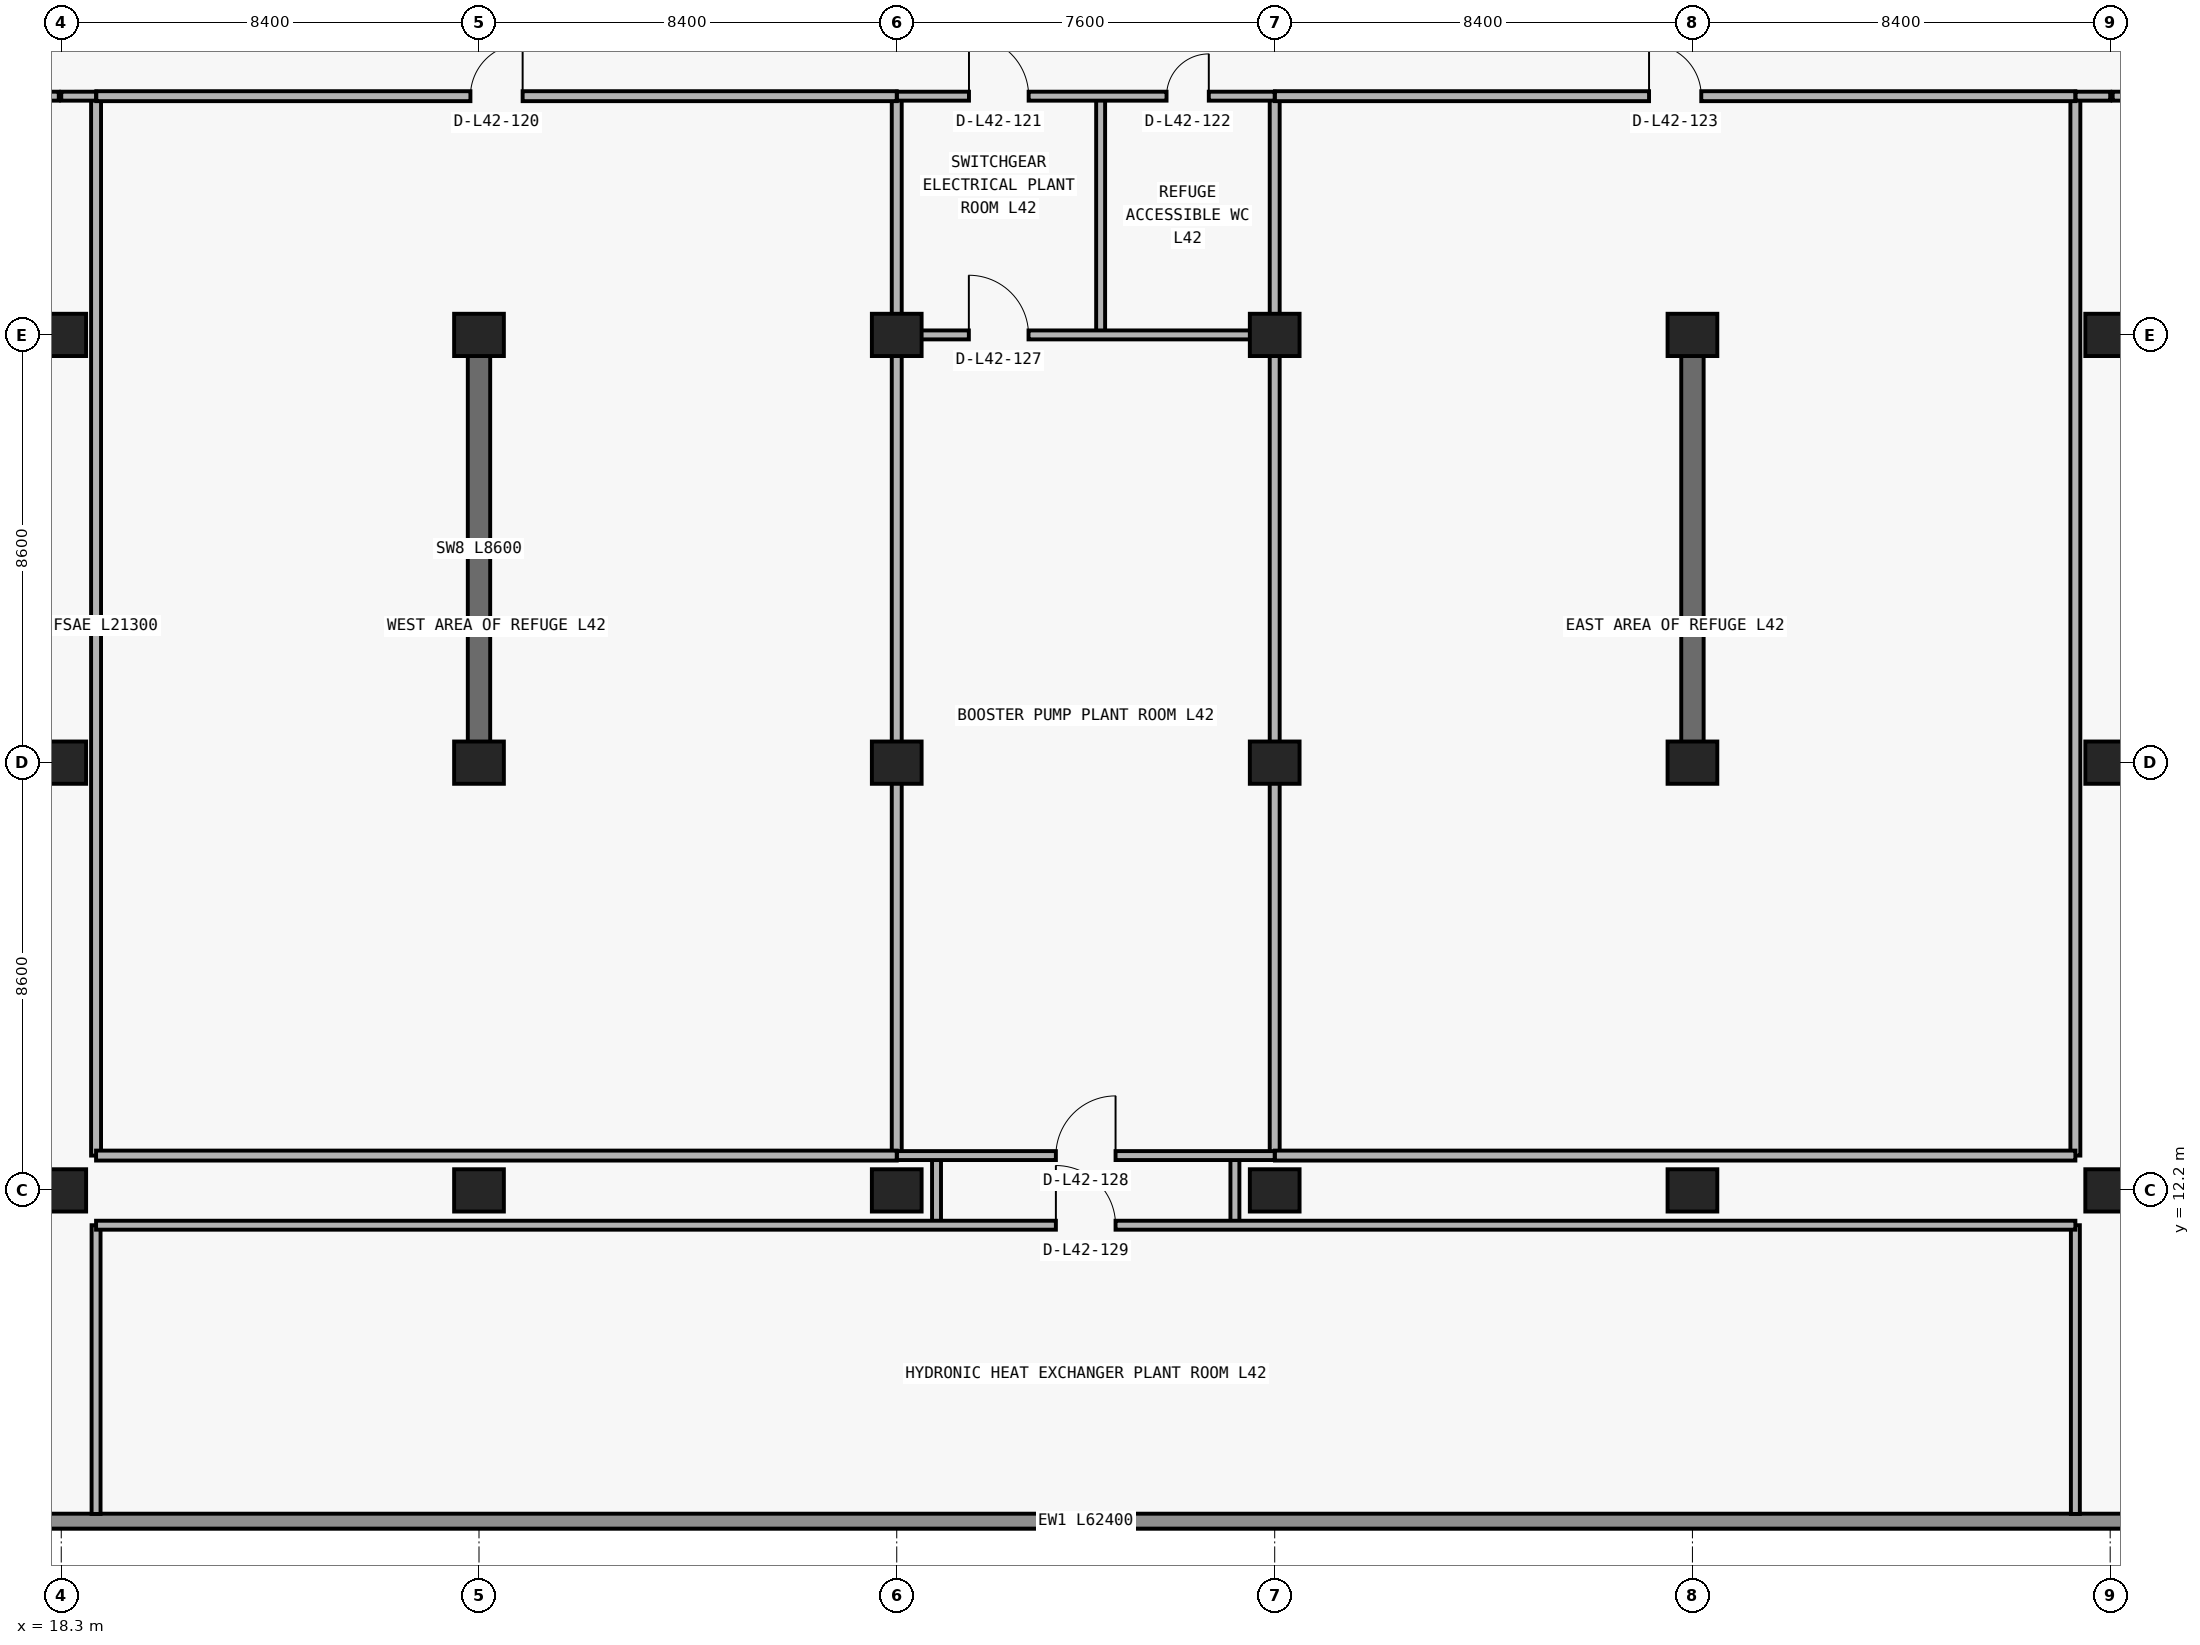
"""IFC4 building model, lengths in metres.
Left out: names, types, materials, properties, quantities, classifications, styles, units other than length and angle.
Written with IfcOpenShell. Run it as: python <this file> out.ifc"""

import sys

from ifc_helpers import new_model, si_unit, direction, frame, frame_2d, origin, origin_2d, place, context, subcontext, project, spatial, rectangle, extrude, element, fill, save


model = new_model("IFC4")
c1 = context("Model", 3, precision=1e-05, world=origin(), true_north=direction((0.0, 1.0)))
c2 = subcontext(c1, "Body", "Model", "MODEL_VIEW")
j1 = project(units=[si_unit("LENGTHUNIT", "METRE"), si_unit("PLANEANGLEUNIT", "RADIAN")], contexts=[c1])
p1 = place(None, origin())
s1 = spatial("IfcSite", under=j1, at=p1, CompositionType="ELEMENT")
p2 = place(p1, origin())
s2 = spatial("IfcBuilding", under=s1, at=p2, CompositionType="ELEMENT")
p3 = place(p2, frame((0.0, 0.0, 152.1)))
s3 = spatial("IfcBuildingStorey", under=s2, at=p3, CompositionType="ELEMENT", Elevation=152.1)
for number, where, z_axis, x_axis in (
    (1, (18.3, 12.2, 0.0), (0.0, 0.0, 1.0), (1.0, 0.0, 0.0)),
    (2, (26.7, 12.2, 0.0), (0.0, 0.0, 1.0), (1.0, 0.0, 0.0)),
    (3, (35.1, 12.2, 0.0), (0.0, 0.0, 1.0), (1.0, 0.0, 0.0)),
    (4, (42.7, 12.2, 0.0), (0.0, 0.0, 1.0), (1.0, 0.0, 0.0)),
    (5, (51.1, 12.2, 0.0), (0.0, 0.0, 1.0), (1.0, 0.0, 0.0)),
    (6, (59.5, 12.2, 0.0), (0.0, 0.0, 1.0), (1.0, 0.0, 0.0)),
    (7, (18.3, 20.8, 0.0), (0.0, 0.0, 1.0), (1.0, 0.0, 0.0)),
    (8, (26.7, 20.8, 0.0), (0.0, 0.0, 1.0), (1.0, 0.0, 0.0)),
    (9, (35.1, 20.8, 0.0), (0.0, 0.0, 1.0), (1.0, 0.0, 0.0)),
    (10, (42.7, 20.8, 0.0), (0.0, 0.0, 1.0), (1.0, 0.0, 0.0)),
    (11, (51.1, 20.8, 0.0), (0.0, 0.0, 1.0), (1.0, 0.0, 0.0)),
    (12, (59.5, 20.8, 0.0), (0.0, 0.0, 1.0), (1.0, 0.0, 0.0)),
    (13, (18.3, 29.4, 0.0), (0.0, 0.0, 1.0), (1.0, 0.0, 0.0)),
    (14, (26.7, 29.4, 0.0), (0.0, 0.0, 1.0), (1.0, 0.0, 0.0)),
    (15, (35.1, 29.4, 0.0), (0.0, 0.0, 1.0), (1.0, 0.0, 0.0)),
    (16, (42.7, 29.4, 0.0), (0.0, 0.0, 1.0), (1.0, 0.0, 0.0)),
    (17, (51.1, 29.4, 0.0), (0.0, 0.0, 1.0), (1.0, 0.0, 0.0)),
    (18, (59.5, 29.4, 0.0), (0.0, 0.0, 1.0), (1.0, 0.0, 0.0)),
):
    element("IfcColumn", number, at=place(p3, frame(where, z_axis=z_axis, x_axis=x_axis)), inside=s3, PredefinedType="COLUMN", context=c2, shape_type="SweptSolid", body=[
        extrude(rectangle(XDim=1.0, YDim=0.85, at=origin_2d()), origin(), (0.0, 0.0, 1.0), 4.85),
    ])
for number, where, z_axis, x_axis in (
    (19, (26.7, 20.8, 0.0), (0.0, 0.0, 1.0), (0.0, 1.0, 0.0)),
    (20, (51.1, 20.8, 0.0), (0.0, 0.0, 1.0), (0.0, 1.0, 0.0)),
):
    element("IfcWall", number, at=place(p3, frame(where, z_axis=z_axis, x_axis=x_axis)), inside=s3, PredefinedType="SHEAR", context=c2, shape_type="SweptSolid", body=[
        extrude(rectangle(XDim=8.6, YDim=0.45, at=frame_2d((4.3, 0.0))), origin(), (0.0, 0.0, 1.0), 4.85),
    ])
p4 = place(p3, frame((70.1, 5.55, 0.0), z_axis=(0.0, 0.0, 1.0), x_axis=(-1.0, 0.0, 0.0)))
e21 = element("IfcWall", 21, at=p4, inside=s3, PredefinedType="STANDARD", context=c2, shape_type="SweptSolid", body=[
    extrude(rectangle(XDim=62.4, YDim=0.3, at=frame_2d((31.2, 0.0))), origin(), (0.0, 0.0, 1.0), 4.85),
])
p5 = place(p3, frame((19.0, 5.695, 0.0), z_axis=(0.0, 0.0, 1.0), x_axis=(0.0, 1.0, 0.0)))
e22 = element("IfcWall", 22, at=p5, inside=s3, PredefinedType="PARTITIONING", context=c2, shape_type="SweptSolid", body=[
    extrude(rectangle(XDim=5.805, YDim=0.18, at=frame_2d((2.902, 0.0))), origin(), (0.0, 0.0, 1.0), 4.85),
])
p6 = place(p3, frame((19.0, 12.9, 0.0), z_axis=(0.0, 0.0, 1.0), x_axis=(0.0, 1.0, 0.0)))
e23 = element("IfcWall", 23, at=p6, inside=s3, PredefinedType="PARTITIONING", context=c2, shape_type="SweptSolid", body=[
    extrude(rectangle(XDim=21.3, YDim=0.2, at=frame_2d((10.65, 0.0))), origin(), (0.0, 0.0, 1.0), 4.85),
])
p7 = place(p3, frame((35.1, 12.9, 0.0), z_axis=(0.0, 0.0, 1.0), x_axis=(0.0, 1.0, 0.0)))
e24 = element("IfcWall", 24, at=p7, inside=s3, PredefinedType="PARTITIONING", context=c2, shape_type="SweptSolid", body=[
    extrude(rectangle(XDim=21.3, YDim=0.2, at=frame_2d((10.65, 0.0))), origin(), (0.0, 0.0, 1.0), 3.814),
])
p8 = place(p3, frame((35.9, 11.5, 0.0), z_axis=(0.0, 0.0, 1.0), x_axis=(0.0, 1.0, 0.0)))
e25 = element("IfcWall", 25, at=p8, inside=s3, PredefinedType="PARTITIONING", context=c2, shape_type="SweptSolid", body=[
    extrude(rectangle(XDim=1.4, YDim=0.18, at=frame_2d((0.7, 0.0))), origin(), (0.0, 0.0, 1.0), 4.85),
])
p9 = place(p3, frame((39.2, 29.4, 0.0), z_axis=(0.0, 0.0, 1.0), x_axis=(0.0, 1.0, 0.0)))
e26 = element("IfcWall", 26, at=p9, inside=s3, PredefinedType="PARTITIONING", context=c2, shape_type="SweptSolid", body=[
    extrude(rectangle(XDim=4.8, YDim=0.18, at=frame_2d((2.4, 0.0))), origin(), (0.0, 0.0, 1.0), 4.85),
])
p10 = place(p3, frame((41.9, 11.5, 0.0), z_axis=(0.0, 0.0, 1.0), x_axis=(0.0, 1.0, 0.0)))
e27 = element("IfcWall", 27, at=p10, inside=s3, PredefinedType="PARTITIONING", context=c2, shape_type="SweptSolid", body=[
    extrude(rectangle(XDim=1.4, YDim=0.18, at=frame_2d((0.7, 0.0))), origin(), (0.0, 0.0, 1.0), 4.85),
])
p11 = place(p3, frame((42.7, 12.9, 0.0), z_axis=(0.0, 0.0, 1.0), x_axis=(0.0, 1.0, 0.0)))
e28 = element("IfcWall", 28, at=p11, inside=s3, PredefinedType="PARTITIONING", context=c2, shape_type="SweptSolid", body=[
    extrude(rectangle(XDim=21.3, YDim=0.2, at=frame_2d((10.65, 0.0))), origin(), (0.0, 0.0, 1.0), 3.814),
])
p12 = place(p3, frame((58.8, 5.695, 0.0), z_axis=(0.0, 0.0, 1.0), x_axis=(0.0, 1.0, 0.0)))
e29 = element("IfcWall", 29, at=p12, inside=s3, PredefinedType="PARTITIONING", context=c2, shape_type="SweptSolid", body=[
    extrude(rectangle(XDim=5.805, YDim=0.18, at=frame_2d((2.902, 0.0))), origin(), (0.0, 0.0, 1.0), 4.85),
])
p13 = place(p3, frame((58.8, 12.9, 0.0), z_axis=(0.0, 0.0, 1.0), x_axis=(0.0, 1.0, 0.0)))
e30 = element("IfcWall", 30, at=p13, inside=s3, PredefinedType="PARTITIONING", context=c2, shape_type="SweptSolid", body=[
    extrude(rectangle(XDim=21.3, YDim=0.2, at=frame_2d((10.65, 0.0))), origin(), (0.0, 0.0, 1.0), 4.85),
])
p14 = place(p3, frame((19.0, 11.5, 0.0), z_axis=(0.0, 0.0, 1.0), x_axis=(1.0, 0.0, 0.0)))
e31 = element("IfcWall", 31, at=p14, inside=s3, PredefinedType="PARTITIONING", context=c2, shape_type="SweptSolid", body=[
    extrude(rectangle(XDim=39.8, YDim=0.18, at=frame_2d((19.9, 0.0))), origin(), (0.0, 0.0, 1.0), 4.85),
])
p15 = place(p14, frame((19.3, 0.0, 0.0)))
e32 = element("IfcOpeningElement", 32, at=p15, cuts=e31, PredefinedType="OPENING", context=c2, shape_type="SweptSolid", body=[
    extrude(rectangle(XDim=1.2, YDim=2.2, at=frame_2d((0.6, 1.1))), frame((0.0, 0.1, 0.0), z_axis=(0.0, -1.0, 0.0), x_axis=(1.0, 0.0, 0.0)), (0.0, 0.0, 1.0), 0.2),
])
p16 = place(p3, frame((19.0, 12.9, 0.0), z_axis=(0.0, 0.0, 1.0), x_axis=(1.0, 0.0, 0.0)))
e33 = element("IfcWall", 33, at=p16, inside=s3, PredefinedType="PARTITIONING", context=c2, shape_type="SweptSolid", body=[
    extrude(rectangle(XDim=16.1, YDim=0.2, at=frame_2d((8.05, 0.0))), origin(), (0.0, 0.0, 1.0), 4.85),
])
p17 = place(p3, frame((35.105, 12.9, 0.0), z_axis=(0.0, 0.0, 1.0), x_axis=(1.0, 0.0, 0.0)))
e34 = element("IfcWall", 34, at=p17, inside=s3, PredefinedType="PARTITIONING", context=c2, shape_type="SweptSolid", body=[
    extrude(rectangle(XDim=7.595, YDim=0.18, at=frame_2d((3.797, 0.0))), origin(), (0.0, 0.0, 1.0), 4.85),
])
p18 = place(p17, frame((3.195, 0.0, 0.0)))
e35 = element("IfcOpeningElement", 35, at=p18, cuts=e34, PredefinedType="OPENING", context=c2, shape_type="SweptSolid", body=[
    extrude(rectangle(XDim=1.2, YDim=2.2, at=frame_2d((0.6, 1.1))), frame((0.0, 0.1, 0.0), z_axis=(0.0, -1.0, 0.0), x_axis=(1.0, 0.0, 0.0)), (0.0, 0.0, 1.0), 0.2),
])
p19 = place(p3, frame((42.705, 12.9, 0.0), z_axis=(0.0, 0.0, 1.0), x_axis=(1.0, 0.0, 0.0)))
e36 = element("IfcWall", 36, at=p19, inside=s3, PredefinedType="PARTITIONING", context=c2, shape_type="SweptSolid", body=[
    extrude(rectangle(XDim=16.095, YDim=0.2, at=frame_2d((8.047, 0.0))), origin(), (0.0, 0.0, 1.0), 4.85),
])
p20 = place(p3, frame((35.1, 29.4, 0.0), z_axis=(0.0, 0.0, 1.0), x_axis=(1.0, 0.0, 0.0)))
e37 = element("IfcWall", 37, at=p20, inside=s3, PredefinedType="PARTITIONING", context=c2, shape_type="SweptSolid", body=[
    extrude(rectangle(XDim=7.6, YDim=0.18, at=frame_2d((3.8, 0.0))), origin(), (0.0, 0.0, 1.0), 3.814),
])
p21 = place(p20, frame((1.45, 0.0, 0.0)))
e38 = element("IfcOpeningElement", 38, at=p21, cuts=e37, PredefinedType="OPENING", context=c2, shape_type="SweptSolid", body=[
    extrude(rectangle(XDim=1.2, YDim=2.2, at=frame_2d((0.6, 1.1))), frame((0.0, 0.1, 0.0), z_axis=(0.0, -1.0, 0.0), x_axis=(1.0, 0.0, 0.0)), (0.0, 0.0, 1.0), 0.2),
])
p22 = place(p3, frame((7.7, 34.2, 0.0), z_axis=(0.0, 0.0, 1.0), x_axis=(1.0, 0.0, 0.0)))
e39 = element("IfcWall", 39, at=p22, inside=s3, PredefinedType="PARTITIONING", context=c2, shape_type="SweptSolid", body=[
    extrude(rectangle(XDim=10.55, YDim=0.18, at=frame_2d((5.275, 0.0))), origin(), (0.0, 0.0, 1.0), 4.85),
])
p23 = place(p22, frame((4.35, 0.0, 0.0)))
e40 = element("IfcOpeningElement", 40, at=p23, cuts=e39, PredefinedType="OPENING", context=c2, shape_type="SweptSolid", body=[
    extrude(rectangle(XDim=1.2, YDim=2.2, at=frame_2d((0.6, 1.1))), frame((0.0, 0.1, 0.0), z_axis=(0.0, -1.0, 0.0), x_axis=(1.0, 0.0, 0.0)), (0.0, 0.0, 1.0), 0.2),
])
p24 = place(p3, frame((18.3, 34.2, 0.0), z_axis=(0.0, 0.0, 1.0), x_axis=(1.0, 0.0, 0.0)))
e41 = element("IfcWall", 41, at=p24, inside=s3, PredefinedType="PARTITIONING", context=c2, shape_type="SweptSolid", body=[
    extrude(rectangle(XDim=0.7, YDim=0.18, at=frame_2d((0.35, 0.0))), origin(), (0.0, 0.0, 1.0), 4.85),
])
p25 = place(p3, frame((19.005, 34.2, 0.0), z_axis=(0.0, 0.0, 1.0), x_axis=(1.0, 0.0, 0.0)))
e42 = element("IfcWall", 42, at=p25, inside=s3, PredefinedType="PARTITIONING", context=c2, shape_type="SweptSolid", body=[
    extrude(rectangle(XDim=16.095, YDim=0.2, at=frame_2d((8.048, 0.0))), origin(), (0.0, 0.0, 1.0), 4.85),
])
p26 = place(p25, frame((7.522, 0.0, 0.0)))
e43 = element("IfcOpeningElement", 43, at=p26, cuts=e42, PredefinedType="OPENING", context=c2, shape_type="SweptSolid", body=[
    extrude(rectangle(XDim=1.05, YDim=2.15, at=frame_2d((0.525, 1.075))), frame((0.0, 0.11, 0.0), z_axis=(0.0, -1.0, 0.0), x_axis=(1.0, 0.0, 0.0)), (0.0, 0.0, 1.0), 0.22),
])
p27 = place(p3, frame((35.105, 34.2, 0.0), z_axis=(0.0, 0.0, 1.0), x_axis=(1.0, 0.0, 0.0)))
e44 = element("IfcWall", 44, at=p27, inside=s3, PredefinedType="PARTITIONING", context=c2, shape_type="SweptSolid", body=[
    extrude(rectangle(XDim=7.595, YDim=0.18, at=frame_2d((3.797, 0.0))), origin(), (0.0, 0.0, 1.0), 4.85),
])
p28 = place(p27, frame((1.448, 0.0, 0.0)))
e45 = element("IfcOpeningElement", 45, at=p28, cuts=e44, PredefinedType="OPENING", context=c2, shape_type="SweptSolid", body=[
    extrude(rectangle(XDim=1.2, YDim=2.2, at=frame_2d((0.6, 1.1))), frame((0.0, 0.1, 0.0), z_axis=(0.0, -1.0, 0.0), x_axis=(1.0, 0.0, 0.0)), (0.0, 0.0, 1.0), 0.2),
])
p29 = place(p27, frame((5.42, 0.0, 0.0)))
e46 = element("IfcOpeningElement", 46, at=p29, cuts=e44, PredefinedType="OPENING", context=c2, shape_type="SweptSolid", body=[
    extrude(rectangle(XDim=0.85, YDim=2.1, at=frame_2d((0.425, 1.05))), frame((0.0, 0.1, 0.0), z_axis=(0.0, -1.0, 0.0), x_axis=(1.0, 0.0, 0.0)), (0.0, 0.0, 1.0), 0.2),
])
p30 = place(p3, frame((42.705, 34.2, 0.0), z_axis=(0.0, 0.0, 1.0), x_axis=(1.0, 0.0, 0.0)))
e47 = element("IfcWall", 47, at=p30, inside=s3, PredefinedType="PARTITIONING", context=c2, shape_type="SweptSolid", body=[
    extrude(rectangle(XDim=16.095, YDim=0.2, at=frame_2d((8.047, 0.0))), origin(), (0.0, 0.0, 1.0), 4.85),
])
p31 = place(p30, frame((7.522, 0.0, 0.0)))
e48 = element("IfcOpeningElement", 48, at=p31, cuts=e47, PredefinedType="OPENING", context=c2, shape_type="SweptSolid", body=[
    extrude(rectangle(XDim=1.05, YDim=2.15, at=frame_2d((0.525, 1.075))), frame((0.0, 0.11, 0.0), z_axis=(0.0, -1.0, 0.0), x_axis=(1.0, 0.0, 0.0)), (0.0, 0.0, 1.0), 0.22),
])
p32 = place(p3, frame((58.805, 34.2, 0.0), z_axis=(0.0, 0.0, 1.0), x_axis=(1.0, 0.0, 0.0)))
e49 = element("IfcWall", 49, at=p32, inside=s3, PredefinedType="PARTITIONING", context=c2, shape_type="SweptSolid", body=[
    extrude(rectangle(XDim=0.695, YDim=0.18, at=frame_2d((0.348, 0.0))), origin(), (0.0, 0.0, 1.0), 4.85),
])
p33 = place(p3, frame((59.55, 34.2, 0.0), z_axis=(0.0, 0.0, 1.0), x_axis=(1.0, 0.0, 0.0)))
e50 = element("IfcWall", 50, at=p33, inside=s3, PredefinedType="PARTITIONING", context=c2, shape_type="SweptSolid", body=[
    extrude(rectangle(XDim=10.55, YDim=0.18, at=frame_2d((5.275, 0.0))), origin(), (0.0, 0.0, 1.0), 4.85),
])
p34 = place(p33, frame((5.0, 0.0, 0.0)))
e51 = element("IfcOpeningElement", 51, at=p34, cuts=e50, PredefinedType="OPENING", context=c2, shape_type="SweptSolid", body=[
    extrude(rectangle(XDim=1.2, YDim=2.2, at=frame_2d((0.6, 1.1))), frame((0.0, 0.1, 0.0), z_axis=(0.0, -1.0, 0.0), x_axis=(1.0, 0.0, 0.0)), (0.0, 0.0, 1.0), 0.2),
])
p35 = place(p26, origin())
e52 = element("IfcDoor", 52, at=p35, inside=s3, OperationType="SINGLE_SWING_RIGHT", PredefinedType="DOOR", context=c2, shape_type="SweptSolid", body=[
    extrude(rectangle(XDim=1.05, YDim=2.15, at=frame_2d((0.525, 1.075))), frame((0.0, 0.025, 0.0), z_axis=(0.0, -1.0, 0.0), x_axis=(1.0, 0.0, 0.0)), (0.0, 0.0, 1.0), 0.05),
])
fill(e43, e52)
p36 = place(p28, origin())
e53 = element("IfcDoor", 53, at=p36, inside=s3, OperationType="SINGLE_SWING_LEFT", PredefinedType="DOOR", context=c2, shape_type="SweptSolid", body=[
    extrude(rectangle(XDim=1.2, YDim=2.2, at=frame_2d((0.6, 1.1))), frame((0.0, 0.025, 0.0), z_axis=(0.0, -1.0, 0.0), x_axis=(1.0, 0.0, 0.0)), (0.0, 0.0, 1.0), 0.05),
])
fill(e45, e53)
p37 = place(p29, origin())
e54 = element("IfcDoor", 54, at=p37, inside=s3, OperationType="SINGLE_SWING_RIGHT", PredefinedType="DOOR", context=c2, shape_type="SweptSolid", body=[
    extrude(rectangle(XDim=0.85, YDim=2.1, at=frame_2d((0.425, 1.05))), frame((0.0, 0.025, 0.0), z_axis=(0.0, -1.0, 0.0), x_axis=(1.0, 0.0, 0.0)), (0.0, 0.0, 1.0), 0.05),
])
fill(e46, e54)
p38 = place(p31, origin())
e55 = element("IfcDoor", 55, at=p38, inside=s3, OperationType="SINGLE_SWING_LEFT", PredefinedType="DOOR", context=c2, shape_type="SweptSolid", body=[
    extrude(rectangle(XDim=1.05, YDim=2.15, at=frame_2d((0.525, 1.075))), frame((0.0, 0.025, 0.0), z_axis=(0.0, -1.0, 0.0), x_axis=(1.0, 0.0, 0.0)), (0.0, 0.0, 1.0), 0.05),
])
fill(e48, e55)
p39 = place(p21, origin())
e56 = element("IfcDoor", 56, at=p39, inside=s3, OperationType="SINGLE_SWING_LEFT", PredefinedType="DOOR", context=c2, shape_type="SweptSolid", body=[
    extrude(rectangle(XDim=1.2, YDim=2.2, at=frame_2d((0.6, 1.1))), frame((0.0, 0.025, 0.0), z_axis=(0.0, -1.0, 0.0), x_axis=(1.0, 0.0, 0.0)), (0.0, 0.0, 1.0), 0.05),
])
fill(e38, e56)
p40 = place(p18, origin())
e57 = element("IfcDoor", 57, at=p40, inside=s3, OperationType="SINGLE_SWING_RIGHT", PredefinedType="DOOR", context=c2, shape_type="SweptSolid", body=[
    extrude(rectangle(XDim=1.2, YDim=2.2, at=frame_2d((0.6, 1.1))), frame((0.0, 0.025, 0.0), z_axis=(0.0, -1.0, 0.0), x_axis=(1.0, 0.0, 0.0)), (0.0, 0.0, 1.0), 0.05),
])
fill(e35, e57)
p41 = place(p15, origin())
e58 = element("IfcDoor", 58, at=p41, inside=s3, OperationType="SINGLE_SWING_LEFT", PredefinedType="DOOR", context=c2, shape_type="SweptSolid", body=[
    extrude(rectangle(XDim=1.2, YDim=2.2, at=frame_2d((0.6, 1.1))), frame((0.0, 0.025, 0.0), z_axis=(0.0, -1.0, 0.0), x_axis=(1.0, 0.0, 0.0)), (0.0, 0.0, 1.0), 0.05),
])
fill(e32, e58)
save(model, sys.argv[1])
